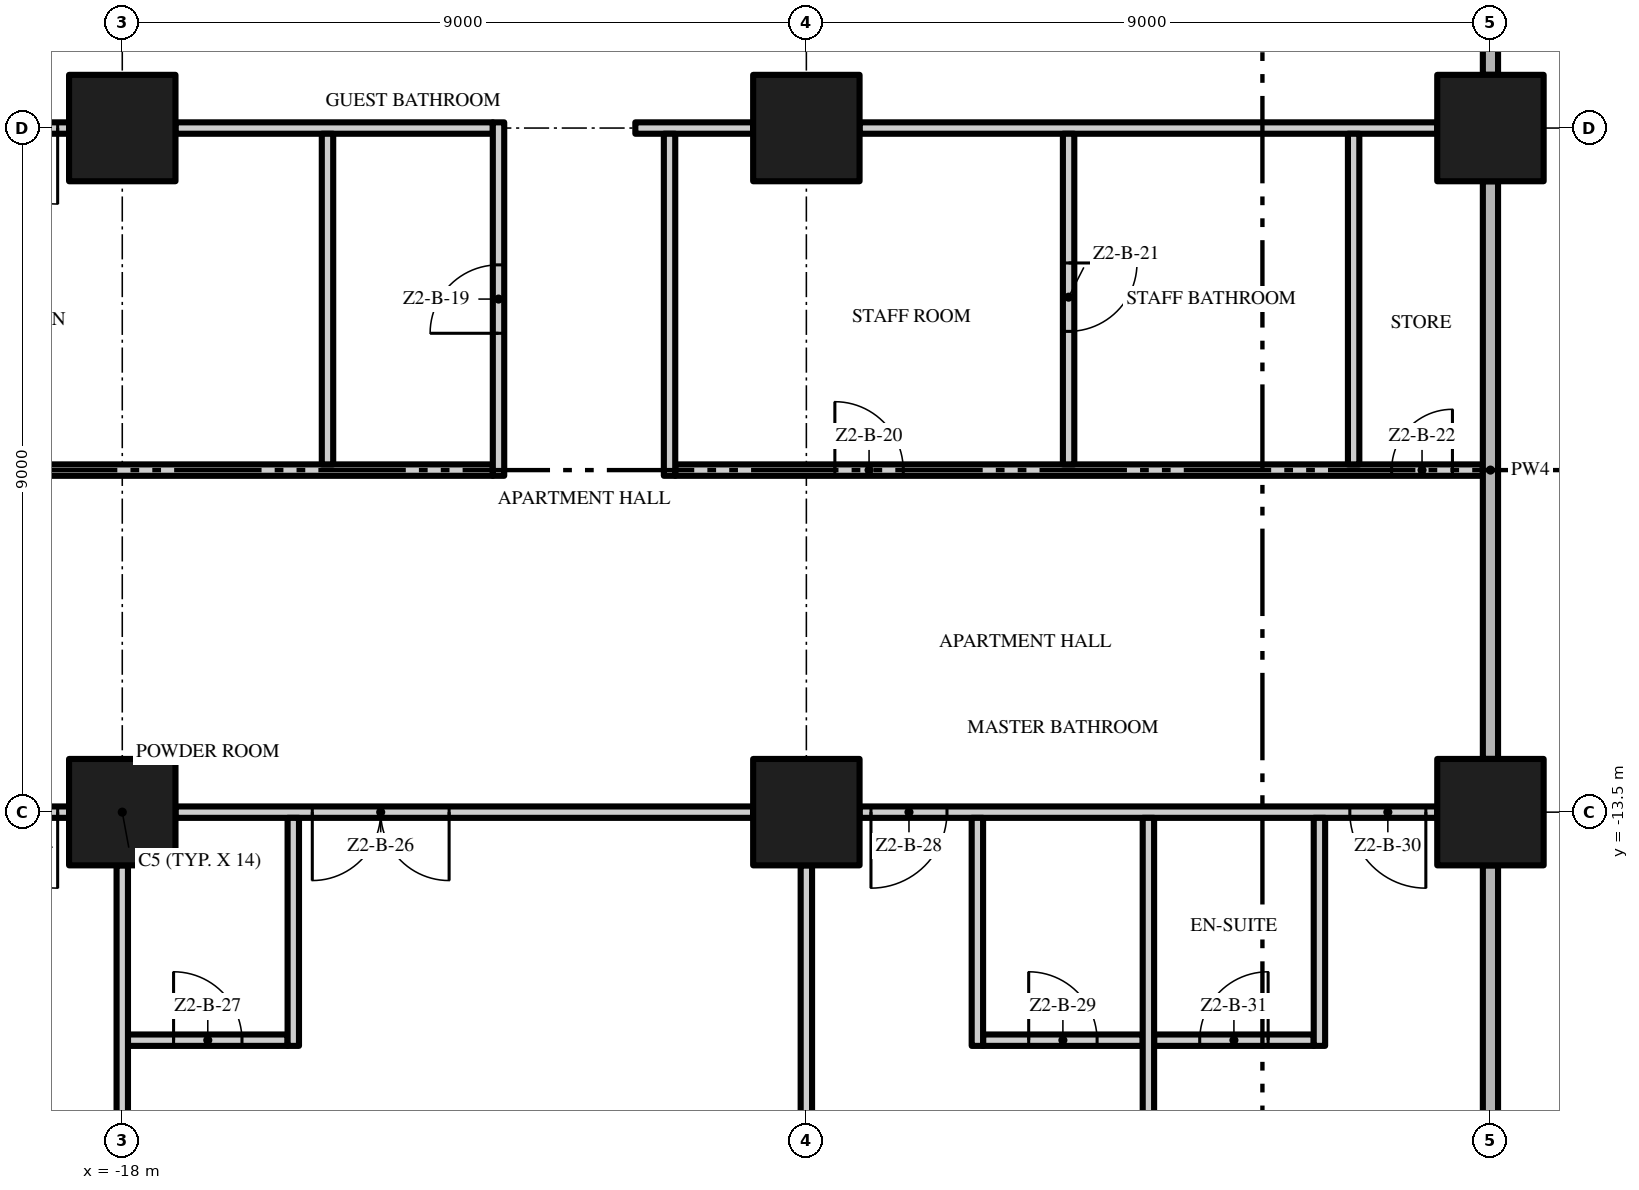
"""IFC4 building model, lengths in metres.
Left out: names, types, materials, properties, quantities, classifications, styles, units other than length and angle.
Written with IfcOpenShell. Run it as: python <this file> out.ifc"""

import sys

from ifc_helpers import new_model, si_unit, direction, frame, frame_2d, origin, origin_2d, place, context, subcontext, project, spatial, rectangle, extrude, element, fill, save


model = new_model("IFC4")
c1 = context("Model", 3, precision=1e-05, world=origin(), true_north=direction((0.0, 1.0)))
c2 = subcontext(c1, "Body", "Model", "MODEL_VIEW")
j1 = project(units=[si_unit("LENGTHUNIT", "METRE"), si_unit("PLANEANGLEUNIT", "RADIAN")], contexts=[c1])
p1 = place(None, origin())
s1 = spatial("IfcSite", under=j1, at=p1, CompositionType="ELEMENT")
p2 = place(p1, origin())
s2 = spatial("IfcBuilding", under=s1, at=p2, CompositionType="ELEMENT")
p3 = place(p2, frame((0.0, 0.0, 88.4)))
s3 = spatial("IfcBuildingStorey", under=s2, at=p3, CompositionType="ELEMENT", Elevation=88.4)
for number, where, z_axis, x_axis in (
    (1, (-18.0, -13.5, 0.0), (0.0, 0.0, 1.0), (1.0, 0.0, 0.0)),
    (2, (-18.0, -4.5, 0.0), (0.0, 0.0, 1.0), (1.0, 0.0, 0.0)),
    (3, (-9.0, -13.5, 0.0), (0.0, 0.0, 1.0), (1.0, 0.0, 0.0)),
    (4, (-9.0, -4.5, 0.0), (0.0, 0.0, 1.0), (1.0, 0.0, 0.0)),
    (5, (0.0, -13.5, 0.0), (0.0, 0.0, 1.0), (1.0, 0.0, 0.0)),
    (6, (0.0, -4.5, 0.0), (0.0, 0.0, 1.0), (1.0, 0.0, 0.0)),
):
    element("IfcColumn", number, at=place(p3, frame(where, z_axis=z_axis, x_axis=x_axis)), inside=s3, PredefinedType="COLUMN", context=c2, shape_type="SweptSolid", body=[
        extrude(rectangle(XDim=1.4, YDim=1.4, at=origin_2d()), origin(), (0.0, 0.0, 1.0), 3.5),
    ])
p4 = place(p3, frame((-17.925, -16.5, 0.0), z_axis=(0.0, 0.0, 1.0), x_axis=(1.0, 0.0, 0.0)))
e7 = element("IfcWall", 7, at=p4, inside=s3, PredefinedType="PARTITIONING", context=c2, shape_type="SweptSolid", body=[
    extrude(rectangle(XDim=2.1, YDim=0.15, at=frame_2d((1.05, 0.0))), origin(), (0.0, 0.0, 1.0), 3.5),
])
p5 = place(p4, frame((0.6, 0.0, 0.0)))
e8 = element("IfcOpeningElement", 8, at=p5, cuts=e7, PredefinedType="OPENING", context=c2, shape_type="SweptSolid", body=[
    extrude(rectangle(XDim=0.9, YDim=2.1, at=frame_2d((0.45, 1.05))), frame((0.0, 0.085, 0.0), z_axis=(0.0, -1.0, 0.0), x_axis=(1.0, 0.0, 0.0)), (0.0, 0.0, 1.0), 0.17),
])
p6 = place(p3, frame((-6.675, -16.5, 0.0), z_axis=(0.0, 0.0, 1.0), x_axis=(1.0, 0.0, 0.0)))
e9 = element("IfcWall", 9, at=p6, inside=s3, PredefinedType="PARTITIONING", context=c2, shape_type="SweptSolid", body=[
    extrude(rectangle(XDim=2.1, YDim=0.15, at=frame_2d((1.05, 0.0))), origin(), (0.0, 0.0, 1.0), 3.5),
])
p7 = place(p6, frame((0.6, 0.0, 0.0)))
e10 = element("IfcOpeningElement", 10, at=p7, cuts=e9, PredefinedType="OPENING", context=c2, shape_type="SweptSolid", body=[
    extrude(rectangle(XDim=0.9, YDim=2.1, at=frame_2d((0.45, 1.05))), frame((0.0, 0.085, 0.0), z_axis=(0.0, -1.0, 0.0), x_axis=(1.0, 0.0, 0.0)), (0.0, 0.0, 1.0), 0.17),
])
p8 = place(p3, frame((-4.425, -16.5, 0.0), z_axis=(0.0, 0.0, 1.0), x_axis=(1.0, 0.0, 0.0)))
e11 = element("IfcWall", 11, at=p8, inside=s3, PredefinedType="PARTITIONING", context=c2, shape_type="SweptSolid", body=[
    extrude(rectangle(XDim=2.1, YDim=0.15, at=frame_2d((1.05, 0.0))), origin(), (0.0, 0.0, 1.0), 3.5),
])
p9 = place(p8, frame((0.6, 0.0, 0.0)))
e12 = element("IfcOpeningElement", 12, at=p9, cuts=e11, PredefinedType="OPENING", context=c2, shape_type="SweptSolid", body=[
    extrude(rectangle(XDim=0.9, YDim=2.1, at=frame_2d((0.45, 1.05))), frame((0.0, 0.085, 0.0), z_axis=(0.0, -1.0, 0.0), x_axis=(1.0, 0.0, 0.0)), (0.0, 0.0, 1.0), 0.17),
])
p10 = place(p3, frame((-18.7, -13.5, 0.0), z_axis=(0.0, 0.0, 1.0), x_axis=(-1.0, 0.0, 0.0)))
e13 = element("IfcWall", 13, at=p10, inside=s3, PredefinedType="PARTITIONING", context=c2, shape_type="SweptSolid", body=[
    extrude(rectangle(XDim=7.0, YDim=0.15, at=frame_2d((3.5, 0.0))), origin(), (0.0, 0.0, 1.0), 3.5),
])
p11 = place(p10, frame((5.55, 0.0, 0.0)))
e14 = element("IfcOpeningElement", 14, at=p11, cuts=e13, PredefinedType="OPENING", context=c2, shape_type="SweptSolid", body=[
    extrude(rectangle(XDim=1.0, YDim=2.4, at=frame_2d((0.5, 1.2))), frame((0.0, 0.085, 0.0), z_axis=(0.0, -1.0, 0.0), x_axis=(1.0, 0.0, 0.0)), (0.0, 0.0, 1.0), 0.17),
])
p12 = place(p10, frame((0.15, 0.0, 0.0)))
e15 = element("IfcOpeningElement", 15, at=p12, cuts=e13, PredefinedType="OPENING", context=c2, shape_type="SweptSolid", body=[
    extrude(rectangle(XDim=1.0, YDim=2.4, at=frame_2d((0.5, 1.2))), frame((0.0, 0.085, 0.0), z_axis=(0.0, -1.0, 0.0), x_axis=(1.0, 0.0, 0.0)), (0.0, 0.0, 1.0), 0.17),
])
p13 = place(p3, frame((-9.7, -13.5, 0.0), z_axis=(0.0, 0.0, 1.0), x_axis=(-1.0, 0.0, 0.0)))
e16 = element("IfcWall", 16, at=p13, inside=s3, PredefinedType="PARTITIONING", context=c2, shape_type="SweptSolid", body=[
    extrude(rectangle(XDim=7.6, YDim=0.15, at=frame_2d((3.8, 0.0))), origin(), (0.0, 0.0, 1.0), 3.5),
])
p14 = place(p13, frame((4.0, 0.0, 0.0)))
e17 = element("IfcOpeningElement", 17, at=p14, cuts=e16, PredefinedType="OPENING", context=c2, shape_type="SweptSolid", body=[
    extrude(rectangle(XDim=1.8, YDim=2.4, at=frame_2d((0.9, 1.2))), frame((0.0, 0.085, 0.0), z_axis=(0.0, -1.0, 0.0), x_axis=(1.0, 0.0, 0.0)), (0.0, 0.0, 1.0), 0.17),
])
p15 = place(p3, frame((-0.7, -13.5, 0.0), z_axis=(0.0, 0.0, 1.0), x_axis=(-1.0, 0.0, 0.0)))
e18 = element("IfcWall", 18, at=p15, inside=s3, PredefinedType="PARTITIONING", context=c2, shape_type="SweptSolid", body=[
    extrude(rectangle(XDim=7.6, YDim=0.15, at=frame_2d((3.8, 0.0))), origin(), (0.0, 0.0, 1.0), 3.5),
])
p16 = place(p15, frame((6.45, 0.0, 0.0)))
e19 = element("IfcOpeningElement", 19, at=p16, cuts=e18, PredefinedType="OPENING", context=c2, shape_type="SweptSolid", body=[
    extrude(rectangle(XDim=1.0, YDim=2.4, at=frame_2d((0.5, 1.2))), frame((0.0, 0.085, 0.0), z_axis=(0.0, -1.0, 0.0), x_axis=(1.0, 0.0, 0.0)), (0.0, 0.0, 1.0), 0.17),
])
p17 = place(p15, frame((0.15, 0.0, 0.0)))
e20 = element("IfcOpeningElement", 20, at=p17, cuts=e18, PredefinedType="OPENING", context=c2, shape_type="SweptSolid", body=[
    extrude(rectangle(XDim=1.0, YDim=2.4, at=frame_2d((0.5, 1.2))), frame((0.0, 0.085, 0.0), z_axis=(0.0, -1.0, 0.0), x_axis=(1.0, 0.0, 0.0)), (0.0, 0.0, 1.0), 0.17),
])
p18 = place(p3, frame((-26.7, -9.0, 0.0), z_axis=(0.0, 0.0, 1.0), x_axis=(1.0, 0.0, 0.0)))
e21 = element("IfcWall", 21, at=p18, inside=s3, PredefinedType="PARTITIONING", context=c2, shape_type="SweptSolid", body=[
    extrude(rectangle(XDim=13.575, YDim=0.15, at=frame_2d((6.787, 0.0))), origin(), (0.0, 0.0, 1.0), 3.5),
])
p19 = place(p3, frame((-10.725, -9.0, 0.0), z_axis=(0.0, 0.0, 1.0), x_axis=(1.0, 0.0, 0.0)))
e22 = element("IfcWall", 22, at=p19, inside=s3, PredefinedType="PARTITIONING", context=c2, shape_type="SweptSolid", body=[
    extrude(rectangle(XDim=10.625, YDim=0.15, at=frame_2d((5.312, 0.0))), origin(), (0.0, 0.0, 1.0), 3.5),
])
p20 = place(p19, frame((2.1, 0.0, 0.0)))
e23 = element("IfcOpeningElement", 23, at=p20, cuts=e22, PredefinedType="OPENING", context=c2, shape_type="SweptSolid", body=[
    extrude(rectangle(XDim=0.9, YDim=2.1, at=frame_2d((0.45, 1.05))), frame((0.0, 0.085, 0.0), z_axis=(0.0, -1.0, 0.0), x_axis=(1.0, 0.0, 0.0)), (0.0, 0.0, 1.0), 0.17),
])
p21 = place(p19, frame((9.425, 0.0, 0.0)))
e24 = element("IfcOpeningElement", 24, at=p21, cuts=e22, PredefinedType="OPENING", context=c2, shape_type="SweptSolid", body=[
    extrude(rectangle(XDim=0.8, YDim=2.0, at=frame_2d((0.4, 1.0))), frame((0.0, 0.085, 0.0), z_axis=(0.0, -1.0, 0.0), x_axis=(1.0, 0.0, 0.0)), (0.0, 0.0, 1.0), 0.17),
])
p22 = place(p3, frame((-18.7, -4.5, 0.0), z_axis=(0.0, 0.0, 1.0), x_axis=(-1.0, 0.0, 0.0)))
e25 = element("IfcWall", 25, at=p22, inside=s3, PredefinedType="PARTITIONING", context=c2, shape_type="SweptSolid", body=[
    extrude(rectangle(XDim=7.0, YDim=0.15, at=frame_2d((3.5, 0.0))), origin(), (0.0, 0.0, 1.0), 3.5),
])
p23 = place(p22, frame((6.05, 0.0, 0.0)))
e26 = element("IfcOpeningElement", 26, at=p23, cuts=e25, PredefinedType="OPENING", context=c2, shape_type="SweptSolid", body=[
    extrude(rectangle(XDim=0.8, YDim=2.0, at=frame_2d((0.4, 1.0))), frame((0.0, 0.085, 0.0), z_axis=(0.0, -1.0, 0.0), x_axis=(1.0, 0.0, 0.0)), (0.0, 0.0, 1.0), 0.17),
])
p24 = place(p22, frame((3.7, 0.0, 0.0)))
e27 = element("IfcOpeningElement", 27, at=p24, cuts=e25, PredefinedType="OPENING", context=c2, shape_type="SweptSolid", body=[
    extrude(rectangle(XDim=0.8, YDim=2.0, at=frame_2d((0.4, 1.0))), frame((0.0, 0.085, 0.0), z_axis=(0.0, -1.0, 0.0), x_axis=(1.0, 0.0, 0.0)), (0.0, 0.0, 1.0), 0.17),
])
p25 = place(p22, frame((0.15, 0.0, 0.0)))
e28 = element("IfcOpeningElement", 28, at=p25, cuts=e25, PredefinedType="OPENING", context=c2, shape_type="SweptSolid", body=[
    extrude(rectangle(XDim=1.0, YDim=2.4, at=frame_2d((0.5, 1.2))), frame((0.0, 0.085, 0.0), z_axis=(0.0, -1.0, 0.0), x_axis=(1.0, 0.0, 0.0)), (0.0, 0.0, 1.0), 0.17),
])
p26 = place(p3, frame((-17.3, -4.5, 0.0), z_axis=(0.0, 0.0, 1.0), x_axis=(1.0, 0.0, 0.0)))
e29 = element("IfcWall", 29, at=p26, inside=s3, PredefinedType="PARTITIONING", context=c2, shape_type="SweptSolid", body=[
    extrude(rectangle(XDim=4.175, YDim=0.15, at=frame_2d((2.087, 0.0))), origin(), (0.0, 0.0, 1.0), 3.5),
])
p27 = place(p3, frame((-11.25, -4.5, 0.0), z_axis=(0.0, 0.0, 1.0), x_axis=(1.0, 0.0, 0.0)))
e30 = element("IfcWall", 30, at=p27, inside=s3, PredefinedType="PARTITIONING", context=c2, shape_type="SweptSolid", body=[
    extrude(rectangle(XDim=1.55, YDim=0.15, at=frame_2d((0.775, 0.0))), origin(), (0.0, 0.0, 1.0), 3.5),
])
p28 = place(p3, frame((-8.3, -4.5, 0.0), z_axis=(0.0, 0.0, 1.0), x_axis=(1.0, 0.0, 0.0)))
e31 = element("IfcWall", 31, at=p28, inside=s3, PredefinedType="PARTITIONING", context=c2, shape_type="SweptSolid", body=[
    extrude(rectangle(XDim=7.6, YDim=0.15, at=frame_2d((3.8, 0.0))), origin(), (0.0, 0.0, 1.0), 3.5),
])
p29 = place(p3, frame((-18.0, -21.2, 0.0), z_axis=(0.0, 0.0, 1.0), x_axis=(0.0, 1.0, 0.0)))
e32 = element("IfcWall", 32, at=p29, inside=s3, PredefinedType="PARTITIONING", context=c2, shape_type="SweptSolid", body=[
    extrude(rectangle(XDim=7.0, YDim=0.15, at=frame_2d((3.5, 0.0))), origin(), (0.0, 0.0, 1.0), 3.5),
])
p30 = place(p3, frame((-15.75, -16.575, 0.0), z_axis=(0.0, 0.0, 1.0), x_axis=(0.0, 1.0, 0.0)))
e33 = element("IfcWall", 33, at=p30, inside=s3, PredefinedType="PARTITIONING", context=c2, shape_type="SweptSolid", body=[
    extrude(rectangle(XDim=3.0, YDim=0.15, at=frame_2d((1.5, 0.0))), origin(), (0.0, 0.0, 1.0), 3.5),
])
p31 = place(p3, frame((-15.3, -8.925, 0.0), z_axis=(0.0, 0.0, 1.0), x_axis=(0.0, 1.0, 0.0)))
e34 = element("IfcWall", 34, at=p31, inside=s3, PredefinedType="PARTITIONING", context=c2, shape_type="SweptSolid", body=[
    extrude(rectangle(XDim=4.35, YDim=0.15, at=frame_2d((2.175, 0.0))), origin(), (0.0, 0.0, 1.0), 3.5),
])
p32 = place(p3, frame((-13.05, -9.075, 0.0), z_axis=(0.0, 0.0, 1.0), x_axis=(0.0, 1.0, 0.0)))
e35 = element("IfcWall", 35, at=p32, inside=s3, PredefinedType="PARTITIONING", context=c2, shape_type="SweptSolid", body=[
    extrude(rectangle(XDim=4.65, YDim=0.15, at=frame_2d((2.325, 0.0))), origin(), (0.0, 0.0, 1.0), 3.5),
])
p33 = place(p32, frame((1.875, 0.0, 0.0)))
e36 = element("IfcOpeningElement", 36, at=p33, cuts=e35, PredefinedType="OPENING", context=c2, shape_type="SweptSolid", body=[
    extrude(rectangle(XDim=0.9, YDim=2.1, at=frame_2d((0.45, 1.05))), frame((0.0, 0.085, 0.0), z_axis=(0.0, -1.0, 0.0), x_axis=(1.0, 0.0, 0.0)), (0.0, 0.0, 1.0), 0.17),
])
p34 = place(p3, frame((-10.8, -9.075, 0.0), z_axis=(0.0, 0.0, 1.0), x_axis=(0.0, 1.0, 0.0)))
e37 = element("IfcWall", 37, at=p34, inside=s3, PredefinedType="PARTITIONING", context=c2, shape_type="SweptSolid", body=[
    extrude(rectangle(XDim=4.5, YDim=0.15, at=frame_2d((2.25, 0.0))), origin(), (0.0, 0.0, 1.0), 3.5),
])
p35 = place(p3, frame((-9.0, -21.2, 0.0), z_axis=(0.0, 0.0, 1.0), x_axis=(0.0, 1.0, 0.0)))
e38 = element("IfcWall", 38, at=p35, inside=s3, PredefinedType="PARTITIONING", context=c2, shape_type="SweptSolid", body=[
    extrude(rectangle(XDim=7.0, YDim=0.15, at=frame_2d((3.5, 0.0))), origin(), (0.0, 0.0, 1.0), 3.5),
])
p36 = place(p3, frame((-6.75, -16.575, 0.0), z_axis=(0.0, 0.0, 1.0), x_axis=(0.0, 1.0, 0.0)))
e39 = element("IfcWall", 39, at=p36, inside=s3, PredefinedType="PARTITIONING", context=c2, shape_type="SweptSolid", body=[
    extrude(rectangle(XDim=3.0, YDim=0.15, at=frame_2d((1.5, 0.0))), origin(), (0.0, 0.0, 1.0), 3.5),
])
p37 = place(p3, frame((-5.55, -4.575, 0.0), z_axis=(0.0, 0.0, 1.0), x_axis=(0.0, -1.0, 0.0)))
e40 = element("IfcWall", 40, at=p37, inside=s3, PredefinedType="PARTITIONING", context=c2, shape_type="SweptSolid", body=[
    extrude(rectangle(XDim=4.35, YDim=0.15, at=frame_2d((2.175, 0.0))), origin(), (0.0, 0.0, 1.0), 3.5),
])
p38 = place(p37, frame((1.7, 0.0, 0.0)))
e41 = element("IfcOpeningElement", 41, at=p38, cuts=e40, PredefinedType="OPENING", context=c2, shape_type="SweptSolid", body=[
    extrude(rectangle(XDim=0.9, YDim=2.1, at=frame_2d((0.45, 1.05))), frame((0.0, 0.085, 0.0), z_axis=(0.0, -1.0, 0.0), x_axis=(1.0, 0.0, 0.0)), (0.0, 0.0, 1.0), 0.17),
])
p39 = place(p3, frame((-4.5, -22.2, 0.0), z_axis=(0.0, 0.0, 1.0), x_axis=(0.0, 1.0, 0.0)))
e42 = element("IfcWall", 42, at=p39, inside=s3, PredefinedType="PARTITIONING", context=c2, shape_type="SweptSolid", body=[
    extrude(rectangle(XDim=8.625, YDim=0.15, at=frame_2d((4.312, 0.0))), origin(), (0.0, 0.0, 1.0), 3.5),
])
p40 = place(p3, frame((-2.25, -16.575, 0.0), z_axis=(0.0, 0.0, 1.0), x_axis=(0.0, 1.0, 0.0)))
e43 = element("IfcWall", 43, at=p40, inside=s3, PredefinedType="PARTITIONING", context=c2, shape_type="SweptSolid", body=[
    extrude(rectangle(XDim=3.0, YDim=0.15, at=frame_2d((1.5, 0.0))), origin(), (0.0, 0.0, 1.0), 3.5),
])
p41 = place(p3, frame((-1.8, -8.925, 0.0), z_axis=(0.0, 0.0, 1.0), x_axis=(0.0, 1.0, 0.0)))
e44 = element("IfcWall", 44, at=p41, inside=s3, PredefinedType="PARTITIONING", context=c2, shape_type="SweptSolid", body=[
    extrude(rectangle(XDim=4.35, YDim=0.15, at=frame_2d((2.175, 0.0))), origin(), (0.0, 0.0, 1.0), 3.5),
])
p42 = place(p3, frame((0.0, -21.2, 0.0), z_axis=(0.0, 0.0, 1.0), x_axis=(0.0, 1.0, 0.0)))
e45 = element("IfcWall", 45, at=p42, inside=s3, PredefinedType="PARTITIONING", context=c2, shape_type="SweptSolid", body=[
    extrude(rectangle(XDim=7.0, YDim=0.2, at=frame_2d((3.5, 0.0))), origin(), (0.0, 0.0, 1.0), 3.5),
])
p43 = place(p3, frame((0.0, -12.8, 0.0), z_axis=(0.0, 0.0, 1.0), x_axis=(0.0, 1.0, 0.0)))
e46 = element("IfcWall", 46, at=p43, inside=s3, PredefinedType="PARTITIONING", context=c2, shape_type="SweptSolid", body=[
    extrude(rectangle(XDim=7.6, YDim=0.2, at=frame_2d((3.8, 0.0))), origin(), (0.0, 0.0, 1.0), 3.5),
])
p44 = place(p3, frame((0.0, -3.8, 0.0), z_axis=(0.0, 0.0, 1.0), x_axis=(0.0, 1.0, 0.0)))
e47 = element("IfcWall", 47, at=p44, inside=s3, PredefinedType="PARTITIONING", context=c2, shape_type="SweptSolid", body=[
    extrude(rectangle(XDim=3.9, YDim=0.2, at=frame_2d((1.95, 0.0))), origin(), (0.0, 0.0, 1.0), 3.5),
])
p45 = place(p25, origin())
e48 = element("IfcDoor", 48, at=p45, inside=s3, OperationType="SINGLE_SWING_LEFT", PredefinedType="DOOR", context=c2, shape_type="SweptSolid", body=[
    extrude(rectangle(XDim=1.0, YDim=2.4, at=frame_2d((0.5, 1.2))), frame((0.0, 0.025, 0.0), z_axis=(0.0, -1.0, 0.0), x_axis=(1.0, 0.0, 0.0)), (0.0, 0.0, 1.0), 0.05),
])
fill(e28, e48)
p46 = place(p33, origin())
e49 = element("IfcDoor", 49, at=p46, inside=s3, OperationType="SINGLE_SWING_LEFT", PredefinedType="DOOR", context=c2, shape_type="SweptSolid", body=[
    extrude(rectangle(XDim=0.9, YDim=2.1, at=frame_2d((0.45, 1.05))), frame((0.0, 0.025, 0.0), z_axis=(0.0, -1.0, 0.0), x_axis=(1.0, 0.0, 0.0)), (0.0, 0.0, 1.0), 0.05),
])
fill(e36, e49)
p47 = place(p20, origin())
e50 = element("IfcDoor", 50, at=p47, inside=s3, OperationType="SINGLE_SWING_LEFT", PredefinedType="DOOR", context=c2, shape_type="SweptSolid", body=[
    extrude(rectangle(XDim=0.9, YDim=2.1, at=frame_2d((0.45, 1.05))), frame((0.0, 0.025, 0.0), z_axis=(0.0, -1.0, 0.0), x_axis=(1.0, 0.0, 0.0)), (0.0, 0.0, 1.0), 0.05),
])
fill(e23, e50)
p48 = place(p38, origin())
e51 = element("IfcDoor", 51, at=p48, inside=s3, OperationType="SINGLE_SWING_LEFT", PredefinedType="DOOR", context=c2, shape_type="SweptSolid", body=[
    extrude(rectangle(XDim=0.9, YDim=2.1, at=frame_2d((0.45, 1.05))), frame((0.0, 0.025, 0.0), z_axis=(0.0, -1.0, 0.0), x_axis=(1.0, 0.0, 0.0)), (0.0, 0.0, 1.0), 0.05),
])
fill(e41, e51)
p49 = place(p21, origin())
e52 = element("IfcDoor", 52, at=p49, inside=s3, OperationType="SINGLE_SWING_RIGHT", PredefinedType="DOOR", context=c2, shape_type="SweptSolid", body=[
    extrude(rectangle(XDim=0.8, YDim=2.0, at=frame_2d((0.4, 1.0))), frame((0.0, 0.025, 0.0), z_axis=(0.0, -1.0, 0.0), x_axis=(1.0, 0.0, 0.0)), (0.0, 0.0, 1.0), 0.05),
])
fill(e24, e52)
p50 = place(p12, origin())
e53 = element("IfcDoor", 53, at=p50, inside=s3, OperationType="SINGLE_SWING_LEFT", PredefinedType="DOOR", context=c2, shape_type="SweptSolid", body=[
    extrude(rectangle(XDim=1.0, YDim=2.4, at=frame_2d((0.5, 1.2))), frame((0.0, 0.025, 0.0), z_axis=(0.0, -1.0, 0.0), x_axis=(1.0, 0.0, 0.0)), (0.0, 0.0, 1.0), 0.05),
])
fill(e15, e53)
p51 = place(p14, origin())
e54 = element("IfcDoor", 54, at=p51, inside=s3, OperationType="DOUBLE_DOOR_SINGLE_SWING", PredefinedType="DOOR", context=c2, shape_type="SweptSolid", body=[
    extrude(rectangle(XDim=1.8, YDim=2.4, at=frame_2d((0.9, 1.2))), frame((0.0, 0.025, 0.0), z_axis=(0.0, -1.0, 0.0), x_axis=(1.0, 0.0, 0.0)), (0.0, 0.0, 1.0), 0.05),
])
fill(e17, e54)
p52 = place(p5, origin())
e55 = element("IfcDoor", 55, at=p52, inside=s3, OperationType="SINGLE_SWING_LEFT", PredefinedType="DOOR", context=c2, shape_type="SweptSolid", body=[
    extrude(rectangle(XDim=0.9, YDim=2.1, at=frame_2d((0.45, 1.05))), frame((0.0, 0.025, 0.0), z_axis=(0.0, -1.0, 0.0), x_axis=(1.0, 0.0, 0.0)), (0.0, 0.0, 1.0), 0.05),
])
fill(e8, e55)
p53 = place(p16, origin())
e56 = element("IfcDoor", 56, at=p53, inside=s3, OperationType="SINGLE_SWING_RIGHT", PredefinedType="DOOR", context=c2, shape_type="SweptSolid", body=[
    extrude(rectangle(XDim=1.0, YDim=2.4, at=frame_2d((0.5, 1.2))), frame((0.0, 0.025, 0.0), z_axis=(0.0, -1.0, 0.0), x_axis=(1.0, 0.0, 0.0)), (0.0, 0.0, 1.0), 0.05),
])
fill(e19, e56)
p54 = place(p7, origin())
e57 = element("IfcDoor", 57, at=p54, inside=s3, OperationType="SINGLE_SWING_LEFT", PredefinedType="DOOR", context=c2, shape_type="SweptSolid", body=[
    extrude(rectangle(XDim=0.9, YDim=2.1, at=frame_2d((0.45, 1.05))), frame((0.0, 0.025, 0.0), z_axis=(0.0, -1.0, 0.0), x_axis=(1.0, 0.0, 0.0)), (0.0, 0.0, 1.0), 0.05),
])
fill(e10, e57)
p55 = place(p17, origin())
e58 = element("IfcDoor", 58, at=p55, inside=s3, OperationType="SINGLE_SWING_LEFT", PredefinedType="DOOR", context=c2, shape_type="SweptSolid", body=[
    extrude(rectangle(XDim=1.0, YDim=2.4, at=frame_2d((0.5, 1.2))), frame((0.0, 0.025, 0.0), z_axis=(0.0, -1.0, 0.0), x_axis=(1.0, 0.0, 0.0)), (0.0, 0.0, 1.0), 0.05),
])
fill(e20, e58)
p56 = place(p9, origin())
e59 = element("IfcDoor", 59, at=p56, inside=s3, OperationType="SINGLE_SWING_RIGHT", PredefinedType="DOOR", context=c2, shape_type="SweptSolid", body=[
    extrude(rectangle(XDim=0.9, YDim=2.1, at=frame_2d((0.45, 1.05))), frame((0.0, 0.025, 0.0), z_axis=(0.0, -1.0, 0.0), x_axis=(1.0, 0.0, 0.0)), (0.0, 0.0, 1.0), 0.05),
])
fill(e12, e59)
save(model, sys.argv[1])
